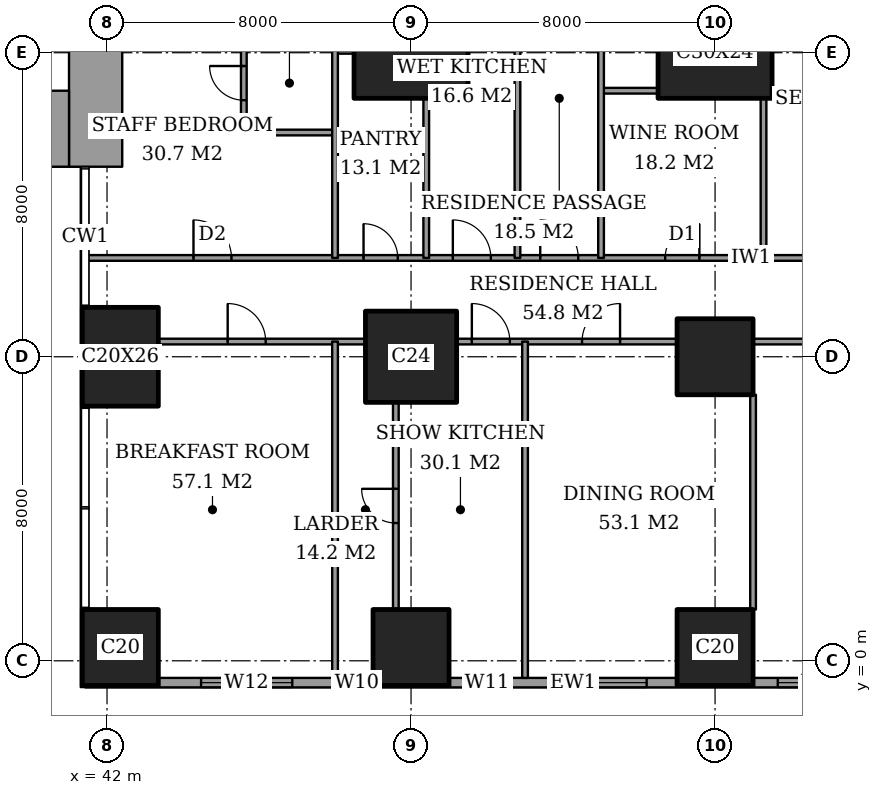
"""IFC4 building model, lengths in metres.
Left out: names, types, materials, properties, quantities, classifications, styles, units other than length and angle.
Written with IfcOpenShell. Run it as: python <this file> out.ifc"""

import sys

from ifc_helpers import new_model, si_unit, direction, frame, frame_2d, origin, origin_2d, place, context, subcontext, project, spatial, rectangle, extrude, element, fill, save


model = new_model("IFC4")
c1 = context("Model", 3, precision=1e-05, world=origin(), true_north=direction((0.0, 1.0)))
c2 = subcontext(c1, "Body", "Model", "MODEL_VIEW")
j1 = project(units=[si_unit("LENGTHUNIT", "METRE"), si_unit("PLANEANGLEUNIT", "RADIAN")], contexts=[c1])
p1 = place(None, origin())
s1 = spatial("IfcSite", under=j1, at=p1, CompositionType="ELEMENT")
p2 = place(p1, origin())
s2 = spatial("IfcBuilding", under=s1, at=p2, CompositionType="ELEMENT")
p3 = place(p2, frame((0.0, 0.0, 135.8)))
s3 = spatial("IfcBuildingStorey", under=s2, at=p3, CompositionType="ELEMENT", Elevation=135.8)
p4 = place(p3, frame((42.35, 0.35, 0.0), z_axis=(0.0, 0.0, 1.0), x_axis=(1.0, 0.0, 0.0)))
e1 = element("IfcColumn", 1, at=p4, inside=s3, PredefinedType="COLUMN", context=c2, shape_type="SweptSolid", body=[
    extrude(rectangle(XDim=2.0, YDim=2.0, at=origin_2d()), origin(), (0.0, 0.0, 1.0), 3.6),
])
p5 = place(p3, frame((42.35, 8.0, 0.0), z_axis=(0.0, 0.0, 1.0), x_axis=(1.0, 0.0, 0.0)))
e2 = element("IfcColumn", 2, at=p5, inside=s3, PredefinedType="COLUMN", context=c2, shape_type="SweptSolid", body=[
    extrude(rectangle(XDim=2.0, YDim=2.6, at=origin_2d()), origin(), (0.0, 0.0, 1.0), 3.6),
])
p6 = place(p3, frame((50.0, 0.35, 0.0), z_axis=(0.0, 0.0, 1.0), x_axis=(1.0, 0.0, 0.0)))
e3 = element("IfcColumn", 3, at=p6, inside=s3, PredefinedType="COLUMN", context=c2, shape_type="SweptSolid", body=[
    extrude(rectangle(XDim=2.0, YDim=2.0, at=origin_2d()), origin(), (0.0, 0.0, 1.0), 3.6),
])
p7 = place(p3, frame((50.0, 8.0, 0.0), z_axis=(0.0, 0.0, 1.0), x_axis=(1.0, 0.0, 0.0)))
e4 = element("IfcColumn", 4, at=p7, inside=s3, PredefinedType="COLUMN", context=c2, shape_type="SweptSolid", body=[
    extrude(rectangle(XDim=2.4, YDim=2.4, at=origin_2d()), origin(), (0.0, 0.0, 1.0), 3.6),
])
p8 = place(p3, frame((50.0, 16.0, 0.0), z_axis=(0.0, 0.0, 1.0), x_axis=(1.0, 0.0, 0.0)))
e5 = element("IfcColumn", 5, at=p8, inside=s3, PredefinedType="COLUMN", context=c2, shape_type="SweptSolid", body=[
    extrude(rectangle(XDim=3.0, YDim=2.4, at=origin_2d()), origin(), (0.0, 0.0, 1.0), 3.6),
])
for number, where, z_axis, x_axis in (
    (6, (58.0, 0.35, 0.0), (0.0, 0.0, 1.0), (1.0, 0.0, 0.0)),
    (7, (58.0, 8.0, 0.0), (0.0, 0.0, 1.0), (1.0, 0.0, 0.0)),
):
    element("IfcColumn", number, at=place(p3, frame(where, z_axis=z_axis, x_axis=x_axis)), inside=s3, PredefinedType="COLUMN", context=c2, shape_type="SweptSolid", body=[
        extrude(rectangle(XDim=2.0, YDim=2.0, at=origin_2d()), origin(), (0.0, 0.0, 1.0), 3.6),
    ])
p9 = place(p3, frame((58.0, 16.0, 0.0), z_axis=(0.0, 0.0, 1.0), x_axis=(1.0, 0.0, 0.0)))
e8 = element("IfcColumn", 8, at=p9, inside=s3, PredefinedType="COLUMN", context=c2, shape_type="SweptSolid", body=[
    extrude(rectangle(XDim=3.0, YDim=2.4, at=origin_2d()), origin(), (0.0, 0.0, 1.0), 3.6),
])
p10 = place(p3, frame((37.85, 14.0, 0.0), z_axis=(0.0, 0.0, 1.0), x_axis=(1.0, 0.0, 0.0)))
e9 = element("IfcWall", 9, at=p10, inside=s3, PredefinedType="SHEAR", context=c2, shape_type="SweptSolid", body=[
    extrude(rectangle(XDim=3.15, YDim=2.0, at=frame_2d((1.575, 0.0))), origin(), (0.0, 0.0, 1.0), 3.6),
])
p11 = place(p3, frame((41.7, 13.0, 0.0), z_axis=(0.0, 0.0, 1.0), x_axis=(0.0, 1.0, 0.0)))
e10 = element("IfcWall", 10, at=p11, inside=s3, PredefinedType="SHEAR", context=c2, shape_type="SweptSolid", body=[
    extrude(rectangle(XDim=11.85, YDim=1.4, at=frame_2d((5.925, 0.0))), origin(), (0.0, 0.0, 1.0), 3.6),
])
p12 = place(p11, frame((7.5, 0.0, 0.0)))
e11 = element("IfcOpeningElement", 11, at=p12, cuts=e10, PredefinedType="OPENING", context=c2, shape_type="SweptSolid", body=[
    extrude(rectangle(XDim=1.8, YDim=2.4, at=frame_2d((0.9, 1.2))), frame((0.0, 0.71, 0.0), z_axis=(0.0, -1.0, 0.0), x_axis=(1.0, 0.0, 0.0)), (0.0, 0.0, 1.0), 1.42),
])
p13 = place(p3, frame((41.425, -0.575, 0.0), z_axis=(0.0, 0.0, 1.0), x_axis=(1.0, 0.0, 0.0)))
e12 = element("IfcWall", 12, at=p13, inside=s3, PredefinedType="SOLIDWALL", context=c2, shape_type="SweptSolid", body=[
    extrude(rectangle(XDim=21.4, YDim=0.25, at=frame_2d((10.7, 0.0))), origin(), (0.0, 0.0, 1.0), 3.6),
])
p14 = place(p13, frame((3.05, 0.0, 0.4)))
e13 = element("IfcOpeningElement", 13, at=p14, cuts=e12, PredefinedType="OPENING", context=c2, shape_type="SweptSolid", body=[
    extrude(rectangle(XDim=2.4, YDim=2.2, at=frame_2d((1.2, 1.1))), frame((0.0, 0.135, 0.0), z_axis=(0.0, -1.0, 0.0), x_axis=(1.0, 0.0, 0.0)), (0.0, 0.0, 1.0), 0.27),
])
p15 = place(p13, frame((6.85, 0.0, 0.4)))
e14 = element("IfcOpeningElement", 14, at=p15, cuts=e12, PredefinedType="OPENING", context=c2, shape_type="SweptSolid", body=[
    extrude(rectangle(XDim=0.6, YDim=2.2, at=frame_2d((0.3, 1.1))), frame((0.0, 0.135, 0.0), z_axis=(0.0, -1.0, 0.0), x_axis=(1.0, 0.0, 0.0)), (0.0, 0.0, 1.0), 0.27),
])
p16 = place(p13, frame((9.975, 0.0, 0.4)))
e15 = element("IfcOpeningElement", 15, at=p16, cuts=e12, PredefinedType="OPENING", context=c2, shape_type="SweptSolid", body=[
    extrude(rectangle(XDim=1.2, YDim=2.2, at=frame_2d((0.6, 1.1))), frame((0.0, 0.135, 0.0), z_axis=(0.0, -1.0, 0.0), x_axis=(1.0, 0.0, 0.0)), (0.0, 0.0, 1.0), 0.27),
])
p17 = place(p13, frame((12.375, 0.0, 0.4)))
e16 = element("IfcOpeningElement", 16, at=p17, cuts=e12, PredefinedType="OPENING", context=c2, shape_type="SweptSolid", body=[
    extrude(rectangle(XDim=2.4, YDim=2.2, at=frame_2d((1.2, 1.1))), frame((0.0, 0.135, 0.0), z_axis=(0.0, -1.0, 0.0), x_axis=(1.0, 0.0, 0.0)), (0.0, 0.0, 1.0), 0.27),
])
p18 = place(p13, frame((18.225, 0.0, 0.4)))
e17 = element("IfcOpeningElement", 17, at=p18, cuts=e12, PredefinedType="OPENING", context=c2, shape_type="SweptSolid", body=[
    extrude(rectangle(XDim=2.4, YDim=2.2, at=frame_2d((1.2, 1.1))), frame((0.0, 0.135, 0.0), z_axis=(0.0, -1.0, 0.0), x_axis=(1.0, 0.0, 0.0)), (0.0, 0.0, 1.0), 0.27),
])
p19 = place(p3, frame((43.35, 8.4, 0.0), z_axis=(0.0, 0.0, 1.0), x_axis=(1.0, 0.0, 0.0)))
e18 = element("IfcWall", 18, at=p19, inside=s3, PredefinedType="PARTITIONING", context=c2, shape_type="SweptSolid", body=[
    extrude(rectangle(XDim=5.45, YDim=0.15, at=frame_2d((2.725, 0.0))), origin(), (0.0, 0.0, 1.0), 3.35),
])
p20 = place(p19, frame((1.825, 0.0, 0.0)))
e19 = element("IfcOpeningElement", 19, at=p20, cuts=e18, PredefinedType="OPENING", context=c2, shape_type="SweptSolid", body=[
    extrude(rectangle(XDim=1.0, YDim=2.1, at=frame_2d((0.5, 1.05))), frame((0.0, 0.085, 0.0), z_axis=(0.0, -1.0, 0.0), x_axis=(1.0, 0.0, 0.0)), (0.0, 0.0, 1.0), 0.17),
])
p21 = place(p3, frame((51.2, 8.4, 0.0), z_axis=(0.0, 0.0, 1.0), x_axis=(1.0, 0.0, 0.0)))
e20 = element("IfcWall", 20, at=p21, inside=s3, PredefinedType="PARTITIONING", context=c2, shape_type="SweptSolid", body=[
    extrude(rectangle(XDim=5.8, YDim=0.15, at=frame_2d((2.9, 0.0))), origin(), (0.0, 0.0, 1.0), 3.35),
])
p22 = place(p21, frame((3.3, 0.0, 0.0)))
e21 = element("IfcOpeningElement", 21, at=p22, cuts=e20, PredefinedType="OPENING", context=c2, shape_type="SweptSolid", body=[
    extrude(rectangle(XDim=1.0, YDim=2.1, at=frame_2d((0.5, 1.05))), frame((0.0, 0.085, 0.0), z_axis=(0.0, -1.0, 0.0), x_axis=(1.0, 0.0, 0.0)), (0.0, 0.0, 1.0), 0.17),
])
p23 = place(p21, frame((0.4, 0.0, 0.0)))
e22 = element("IfcOpeningElement", 22, at=p23, cuts=e20, PredefinedType="OPENING", context=c2, shape_type="SweptSolid", body=[
    extrude(rectangle(XDim=1.0, YDim=2.1, at=frame_2d((0.5, 1.05))), frame((0.0, 0.085, 0.0), z_axis=(0.0, -1.0, 0.0), x_axis=(1.0, 0.0, 0.0)), (0.0, 0.0, 1.0), 0.17),
])
p24 = place(p3, frame((59.0, 8.4, 0.0), z_axis=(0.0, 0.0, 1.0), x_axis=(1.0, 0.0, 0.0)))
e23 = element("IfcWall", 23, at=p24, inside=s3, PredefinedType="PARTITIONING", context=c2, shape_type="SweptSolid", body=[
    extrude(rectangle(XDim=5.65, YDim=0.15, at=frame_2d((2.825, 0.0))), origin(), (0.0, 0.0, 1.0), 3.35),
])
p25 = place(p24, frame((2.325, 0.0, 0.0)))
e24 = element("IfcOpeningElement", 24, at=p25, cuts=e23, PredefinedType="OPENING", context=c2, shape_type="SweptSolid", body=[
    extrude(rectangle(XDim=1.0, YDim=2.1, at=frame_2d((0.5, 1.05))), frame((0.0, 0.085, 0.0), z_axis=(0.0, -1.0, 0.0), x_axis=(1.0, 0.0, 0.0)), (0.0, 0.0, 1.0), 0.17),
])
p26 = place(p3, frame((41.439, 10.6, 0.0), z_axis=(0.0, 0.0, 1.0), x_axis=(1.0, 0.0, 0.0)))
e25 = element("IfcWall", 25, at=p26, inside=s3, PredefinedType="PARTITIONING", context=c2, shape_type="SweptSolid", body=[
    extrude(rectangle(XDim=25.011, YDim=0.15, at=frame_2d((12.505, 0.0))), origin(), (0.0, 0.0, 1.0), 3.35),
])
p27 = place(p26, frame((11.961, 0.0, 0.0)))
e26 = element("IfcOpeningElement", 26, at=p27, cuts=e25, PredefinedType="OPENING", context=c2, shape_type="SweptSolid", body=[
    extrude(rectangle(XDim=1.0, YDim=2.1, at=frame_2d((0.5, 1.05))), frame((0.0, 0.085, 0.0), z_axis=(0.0, -1.0, 0.0), x_axis=(1.0, 0.0, 0.0)), (0.0, 0.0, 1.0), 0.17),
])
p28 = place(p26, frame((20.924, 0.0, 0.0)))
e27 = element("IfcOpeningElement", 27, at=p28, cuts=e25, PredefinedType="OPENING", context=c2, shape_type="SweptSolid", body=[
    extrude(rectangle(XDim=1.0, YDim=2.1, at=frame_2d((0.5, 1.05))), frame((0.0, 0.085, 0.0), z_axis=(0.0, -1.0, 0.0), x_axis=(1.0, 0.0, 0.0)), (0.0, 0.0, 1.0), 0.17),
])
p29 = place(p26, frame((15.249, 0.0, 0.0)))
e28 = element("IfcOpeningElement", 28, at=p29, cuts=e25, PredefinedType="OPENING", context=c2, shape_type="SweptSolid", body=[
    extrude(rectangle(XDim=0.9, YDim=2.1, at=frame_2d((0.45, 1.05))), frame((0.0, 0.085, 0.0), z_axis=(0.0, -1.0, 0.0), x_axis=(1.0, 0.0, 0.0)), (0.0, 0.0, 1.0), 0.17),
])
p30 = place(p26, frame((9.661, 0.0, 0.0)))
e29 = element("IfcOpeningElement", 29, at=p30, cuts=e25, PredefinedType="OPENING", context=c2, shape_type="SweptSolid", body=[
    extrude(rectangle(XDim=1.0, YDim=2.1, at=frame_2d((0.5, 1.05))), frame((0.0, 0.085, 0.0), z_axis=(0.0, -1.0, 0.0), x_axis=(1.0, 0.0, 0.0)), (0.0, 0.0, 1.0), 0.17),
])
p31 = place(p26, frame((7.311, 0.0, 0.0)))
e30 = element("IfcOpeningElement", 30, at=p31, cuts=e25, PredefinedType="OPENING", context=c2, shape_type="SweptSolid", body=[
    extrude(rectangle(XDim=0.9, YDim=2.1, at=frame_2d((0.45, 1.05))), frame((0.0, 0.085, 0.0), z_axis=(0.0, -1.0, 0.0), x_axis=(1.0, 0.0, 0.0)), (0.0, 0.0, 1.0), 0.17),
])
p32 = place(p26, frame((2.836, 0.0, 0.0)))
e31 = element("IfcOpeningElement", 31, at=p32, cuts=e25, PredefinedType="OPENING", context=c2, shape_type="SweptSolid", body=[
    extrude(rectangle(XDim=1.0, YDim=2.1, at=frame_2d((0.5, 1.05))), frame((0.0, 0.085, 0.0), z_axis=(0.0, -1.0, 0.0), x_axis=(1.0, 0.0, 0.0)), (0.0, 0.0, 1.0), 0.17),
])
p33 = place(p3, frame((45.6, 13.9, 0.0), z_axis=(0.0, 0.0, 1.0), x_axis=(1.0, 0.0, 0.0)))
e32 = element("IfcWall", 32, at=p33, inside=s3, PredefinedType="PARTITIONING", context=c2, shape_type="SweptSolid", body=[
    extrude(rectangle(XDim=2.4, YDim=0.15, at=frame_2d((1.2, 0.0))), origin(), (0.0, 0.0, 1.0), 3.35),
])
p34 = place(p3, frame((55.0, 15.0, 0.0), z_axis=(0.0, 0.0, 1.0), x_axis=(1.0, 0.0, 0.0)))
e33 = element("IfcWall", 33, at=p34, inside=s3, PredefinedType="PARTITIONING", context=c2, shape_type="SweptSolid", body=[
    extrude(rectangle(XDim=1.5, YDim=0.15, at=frame_2d((0.75, 0.0))), origin(), (0.0, 0.0, 1.0), 3.35),
])
p35 = place(p3, frame((48.0, 16.05, 0.0), z_axis=(0.0, 0.0, 1.0), x_axis=(1.0, 0.0, 0.0)))
e34 = element("IfcWall", 34, at=p35, inside=s3, PredefinedType="PARTITIONING", context=c2, shape_type="SweptSolid", body=[
    extrude(rectangle(XDim=0.5, YDim=0.15, at=frame_2d((0.25, 0.0))), origin(), (0.0, 0.0, 1.0), 2.634),
])
p36 = place(p3, frame((45.6, 13.9, 0.0), z_axis=(0.0, 0.0, 1.0), x_axis=(0.0, 1.0, 0.0)))
e35 = element("IfcWall", 35, at=p36, inside=s3, PredefinedType="PARTITIONING", context=c2, shape_type="SweptSolid", body=[
    extrude(rectangle(XDim=2.6, YDim=0.15, at=frame_2d((1.3, 0.0))), origin(), (0.0, 0.0, 1.0), 3.35),
])
p37 = place(p36, frame((0.85, 0.0, 0.0)))
e36 = element("IfcOpeningElement", 36, at=p37, cuts=e35, PredefinedType="OPENING", context=c2, shape_type="SweptSolid", body=[
    extrude(rectangle(XDim=0.9, YDim=2.1, at=frame_2d((0.45, 1.05))), frame((0.0, 0.085, 0.0), z_axis=(0.0, -1.0, 0.0), x_axis=(1.0, 0.0, 0.0)), (0.0, 0.0, 1.0), 0.17),
])
p38 = place(p3, frame((48.0, -0.45, 0.0), z_axis=(0.0, 0.0, 1.0), x_axis=(0.0, 1.0, 0.0)))
e37 = element("IfcWall", 37, at=p38, inside=s3, PredefinedType="PARTITIONING", context=c2, shape_type="SweptSolid", body=[
    extrude(rectangle(XDim=8.85, YDim=0.15, at=frame_2d((4.425, 0.0))), origin(), (0.0, 0.0, 1.0), 3.35),
])
p39 = place(p3, frame((48.0, 10.6, 0.0), z_axis=(0.0, 0.0, 1.0), x_axis=(0.0, 1.0, 0.0)))
e38 = element("IfcWall", 38, at=p39, inside=s3, PredefinedType="PARTITIONING", context=c2, shape_type="SweptSolid", body=[
    extrude(rectangle(XDim=8.4, YDim=0.15, at=frame_2d((4.2, 0.0))), origin(), (0.0, 0.0, 1.0), 3.35),
])
p40 = place(p39, frame((6.7, 0.0, 0.0)))
e39 = element("IfcOpeningElement", 39, at=p40, cuts=e38, PredefinedType="OPENING", context=c2, shape_type="SweptSolid", body=[
    extrude(rectangle(XDim=0.9, YDim=2.1, at=frame_2d((0.45, 1.05))), frame((0.0, 0.085, 0.0), z_axis=(0.0, -1.0, 0.0), x_axis=(1.0, 0.0, 0.0)), (0.0, 0.0, 1.0), 0.17),
])
p41 = place(p3, frame((49.6, 1.35, 0.0), z_axis=(0.0, 0.0, 1.0), x_axis=(0.0, 1.0, 0.0)))
e40 = element("IfcWall", 40, at=p41, inside=s3, PredefinedType="PARTITIONING", context=c2, shape_type="SweptSolid", body=[
    extrude(rectangle(XDim=5.45, YDim=0.15, at=frame_2d((2.725, 0.0))), origin(), (0.0, 0.0, 1.0), 3.35),
])
p42 = place(p41, frame((2.275, 0.0, 0.0)))
e41 = element("IfcOpeningElement", 41, at=p42, cuts=e40, PredefinedType="OPENING", context=c2, shape_type="SweptSolid", body=[
    extrude(rectangle(XDim=0.9, YDim=2.1, at=frame_2d((0.45, 1.05))), frame((0.0, 0.085, 0.0), z_axis=(0.0, -1.0, 0.0), x_axis=(1.0, 0.0, 0.0)), (0.0, 0.0, 1.0), 0.17),
])
p43 = place(p3, frame((50.4, 10.6, 0.0), z_axis=(0.0, 0.0, 1.0), x_axis=(0.0, 1.0, 0.0)))
e42 = element("IfcWall", 42, at=p43, inside=s3, PredefinedType="PARTITIONING", context=c2, shape_type="SweptSolid", body=[
    extrude(rectangle(XDim=4.2, YDim=0.15, at=frame_2d((2.1, 0.0))), origin(), (0.0, 0.0, 1.0), 3.35),
])
p44 = place(p3, frame((52.8, 10.6, 0.0), z_axis=(0.0, 0.0, 1.0), x_axis=(0.0, 1.0, 0.0)))
e43 = element("IfcWall", 43, at=p44, inside=s3, PredefinedType="PARTITIONING", context=c2, shape_type="SweptSolid", body=[
    extrude(rectangle(XDim=8.4, YDim=0.15, at=frame_2d((4.2, 0.0))), origin(), (0.0, 0.0, 1.0), 3.35),
])
p45 = place(p3, frame((53.0, -0.45, 0.0), z_axis=(0.0, 0.0, 1.0), x_axis=(0.0, 1.0, 0.0)))
e44 = element("IfcWall", 44, at=p45, inside=s3, PredefinedType="PARTITIONING", context=c2, shape_type="SweptSolid", body=[
    extrude(rectangle(XDim=8.85, YDim=0.15, at=frame_2d((4.425, 0.0))), origin(), (0.0, 0.0, 1.0), 3.35),
])
p46 = place(p3, frame((55.0, 10.6, 0.0), z_axis=(0.0, 0.0, 1.0), x_axis=(0.0, 1.0, 0.0)))
e45 = element("IfcWall", 45, at=p46, inside=s3, PredefinedType="PARTITIONING", context=c2, shape_type="SweptSolid", body=[
    extrude(rectangle(XDim=11.0, YDim=0.15, at=frame_2d((5.5, 0.0))), origin(), (0.0, 0.0, 1.0), 3.35),
])
p47 = place(p46, frame((9.2, 0.0, 0.0)))
e46 = element("IfcOpeningElement", 46, at=p47, cuts=e45, PredefinedType="OPENING", context=c2, shape_type="SweptSolid", body=[
    extrude(rectangle(XDim=1.0, YDim=2.1, at=frame_2d((0.5, 1.05))), frame((0.0, 0.085, 0.0), z_axis=(0.0, -1.0, 0.0), x_axis=(1.0, 0.0, 0.0)), (0.0, 0.0, 1.0), 0.17),
])
p48 = place(p3, frame((59.0, 1.35, 0.0), z_axis=(0.0, 0.0, 1.0), x_axis=(0.0, 1.0, 0.0)))
e47 = element("IfcWall", 47, at=p48, inside=s3, PredefinedType="PARTITIONING", context=c2, shape_type="SweptSolid", body=[
    extrude(rectangle(XDim=5.65, YDim=0.15, at=frame_2d((2.825, 0.0))), origin(), (0.0, 0.0, 1.0), 3.35),
])
p49 = place(p3, frame((59.275, 10.6, 0.0), z_axis=(0.0, 0.0, 1.0), x_axis=(0.0, 1.0, 0.0)))
e48 = element("IfcWall", 48, at=p49, inside=s3, PredefinedType="PARTITIONING", context=c2, shape_type="SweptSolid", body=[
    extrude(rectangle(XDim=4.2, YDim=0.15, at=frame_2d((2.1, 0.0))), origin(), (0.0, 0.0, 1.0), 3.35),
])
p50 = place(p14, origin())
e49 = element("IfcWindow", 49, at=p50, inside=s3, PartitioningType="SINGLE_PANEL", PredefinedType="WINDOW", context=c2, shape_type="SweptSolid", body=[
    extrude(rectangle(XDim=2.4, YDim=2.2, at=frame_2d((1.2, 1.1))), frame((0.0, 0.03, 0.0), z_axis=(0.0, -1.0, 0.0), x_axis=(1.0, 0.0, 0.0)), (0.0, 0.0, 1.0), 0.06),
])
fill(e13, e49)
p51 = place(p15, origin())
e50 = element("IfcWindow", 50, at=p51, inside=s3, PartitioningType="SINGLE_PANEL", PredefinedType="WINDOW", context=c2, shape_type="SweptSolid", body=[
    extrude(rectangle(XDim=0.6, YDim=2.2, at=frame_2d((0.3, 1.1))), frame((0.0, 0.03, 0.0), z_axis=(0.0, -1.0, 0.0), x_axis=(1.0, 0.0, 0.0)), (0.0, 0.0, 1.0), 0.06),
])
fill(e14, e50)
p52 = place(p16, origin())
e51 = element("IfcWindow", 51, at=p52, inside=s3, PartitioningType="SINGLE_PANEL", PredefinedType="WINDOW", context=c2, shape_type="SweptSolid", body=[
    extrude(rectangle(XDim=1.2, YDim=2.2, at=frame_2d((0.6, 1.1))), frame((0.0, 0.03, 0.0), z_axis=(0.0, -1.0, 0.0), x_axis=(1.0, 0.0, 0.0)), (0.0, 0.0, 1.0), 0.06),
])
fill(e15, e51)
p53 = place(p17, origin())
e52 = element("IfcWindow", 52, at=p53, inside=s3, PartitioningType="SINGLE_PANEL", PredefinedType="WINDOW", context=c2, shape_type="SweptSolid", body=[
    extrude(rectangle(XDim=2.4, YDim=2.2, at=frame_2d((1.2, 1.1))), frame((0.0, 0.03, 0.0), z_axis=(0.0, -1.0, 0.0), x_axis=(1.0, 0.0, 0.0)), (0.0, 0.0, 1.0), 0.06),
])
fill(e16, e52)
p54 = place(p18, origin())
e53 = element("IfcWindow", 53, at=p54, inside=s3, PartitioningType="SINGLE_PANEL", PredefinedType="WINDOW", context=c2, shape_type="SweptSolid", body=[
    extrude(rectangle(XDim=2.4, YDim=2.2, at=frame_2d((1.2, 1.1))), frame((0.0, 0.03, 0.0), z_axis=(0.0, -1.0, 0.0), x_axis=(1.0, 0.0, 0.0)), (0.0, 0.0, 1.0), 0.06),
])
fill(e17, e53)
p55 = place(p22, origin())
e54 = element("IfcDoor", 54, at=p55, inside=s3, OperationType="SINGLE_SWING_LEFT", PredefinedType="DOOR", context=c2, shape_type="SweptSolid", body=[
    extrude(rectangle(XDim=1.0, YDim=2.1, at=frame_2d((0.5, 1.05))), frame((0.0, 0.025, 0.0), z_axis=(0.0, -1.0, 0.0), x_axis=(1.0, 0.0, 0.0)), (0.0, 0.0, 1.0), 0.05),
])
fill(e21, e54)
p56 = place(p23, origin())
e55 = element("IfcDoor", 55, at=p56, inside=s3, OperationType="SINGLE_SWING_RIGHT", PredefinedType="DOOR", context=c2, shape_type="SweptSolid", body=[
    extrude(rectangle(XDim=1.0, YDim=2.1, at=frame_2d((0.5, 1.05))), frame((0.0, 0.025, 0.0), z_axis=(0.0, -1.0, 0.0), x_axis=(1.0, 0.0, 0.0)), (0.0, 0.0, 1.0), 0.05),
])
fill(e22, e55)
p57 = place(p42, origin())
e56 = element("IfcDoor", 56, at=p57, inside=s3, OperationType="SINGLE_SWING_LEFT", PredefinedType="DOOR", context=c2, shape_type="SweptSolid", body=[
    extrude(rectangle(XDim=0.9, YDim=2.1, at=frame_2d((0.45, 1.05))), frame((0.0, 0.025, 0.0), z_axis=(0.0, -1.0, 0.0), x_axis=(1.0, 0.0, 0.0)), (0.0, 0.0, 1.0), 0.05),
])
fill(e41, e56)
p58 = place(p20, origin())
e57 = element("IfcDoor", 57, at=p58, inside=s3, OperationType="SINGLE_SWING_RIGHT", PredefinedType="DOOR", context=c2, shape_type="SweptSolid", body=[
    extrude(rectangle(XDim=1.0, YDim=2.1, at=frame_2d((0.5, 1.05))), frame((0.0, 0.025, 0.0), z_axis=(0.0, -1.0, 0.0), x_axis=(1.0, 0.0, 0.0)), (0.0, 0.0, 1.0), 0.05),
])
fill(e19, e57)
p59 = place(p27, origin())
e58 = element("IfcDoor", 58, at=p59, inside=s3, OperationType="SINGLE_SWING_RIGHT", PredefinedType="DOOR", context=c2, shape_type="SweptSolid", body=[
    extrude(rectangle(XDim=1.0, YDim=2.1, at=frame_2d((0.5, 1.05))), frame((0.0, 0.025, 0.0), z_axis=(0.0, -1.0, 0.0), x_axis=(1.0, 0.0, 0.0)), (0.0, 0.0, 1.0), 0.05),
])
fill(e26, e58)
p60 = place(p29, origin())
e59 = element("IfcDoor", 59, at=p60, inside=s3, OperationType="SINGLE_SWING_LEFT", PredefinedType="DOOR", context=c2, shape_type="SweptSolid", body=[
    extrude(rectangle(XDim=0.9, YDim=2.1, at=frame_2d((0.45, 1.05))), frame((0.0, 0.025, 0.0), z_axis=(0.0, -1.0, 0.0), x_axis=(1.0, 0.0, 0.0)), (0.0, 0.0, 1.0), 0.05),
])
fill(e28, e59)
p61 = place(p30, origin())
e60 = element("IfcDoor", 60, at=p61, inside=s3, OperationType="SINGLE_SWING_RIGHT", PredefinedType="DOOR", context=c2, shape_type="SweptSolid", body=[
    extrude(rectangle(XDim=1.0, YDim=2.1, at=frame_2d((0.5, 1.05))), frame((0.0, 0.025, 0.0), z_axis=(0.0, -1.0, 0.0), x_axis=(1.0, 0.0, 0.0)), (0.0, 0.0, 1.0), 0.05),
])
fill(e29, e60)
p62 = place(p31, origin())
e61 = element("IfcDoor", 61, at=p62, inside=s3, OperationType="SINGLE_SWING_RIGHT", PredefinedType="DOOR", context=c2, shape_type="SweptSolid", body=[
    extrude(rectangle(XDim=0.9, YDim=2.1, at=frame_2d((0.45, 1.05))), frame((0.0, 0.025, 0.0), z_axis=(0.0, -1.0, 0.0), x_axis=(1.0, 0.0, 0.0)), (0.0, 0.0, 1.0), 0.05),
])
fill(e30, e61)
p63 = place(p37, origin())
e62 = element("IfcDoor", 62, at=p63, inside=s3, OperationType="SINGLE_SWING_LEFT", PredefinedType="DOOR", context=c2, shape_type="SweptSolid", body=[
    extrude(rectangle(XDim=0.9, YDim=2.1, at=frame_2d((0.45, 1.05))), frame((0.0, 0.025, 0.0), z_axis=(0.0, -1.0, 0.0), x_axis=(1.0, 0.0, 0.0)), (0.0, 0.0, 1.0), 0.05),
])
fill(e36, e62)
p64 = place(p32, origin())
e63 = element("IfcDoor", 63, at=p64, inside=s3, OperationType="SINGLE_SWING_RIGHT", PredefinedType="DOOR", context=c2, shape_type="SweptSolid", body=[
    extrude(rectangle(XDim=1.0, YDim=2.1, at=frame_2d((0.5, 1.05))), frame((0.0, 0.025, 0.0), z_axis=(0.0, -1.0, 0.0), x_axis=(1.0, 0.0, 0.0)), (0.0, 0.0, 1.0), 0.05),
])
fill(e31, e63)
save(model, sys.argv[1])
